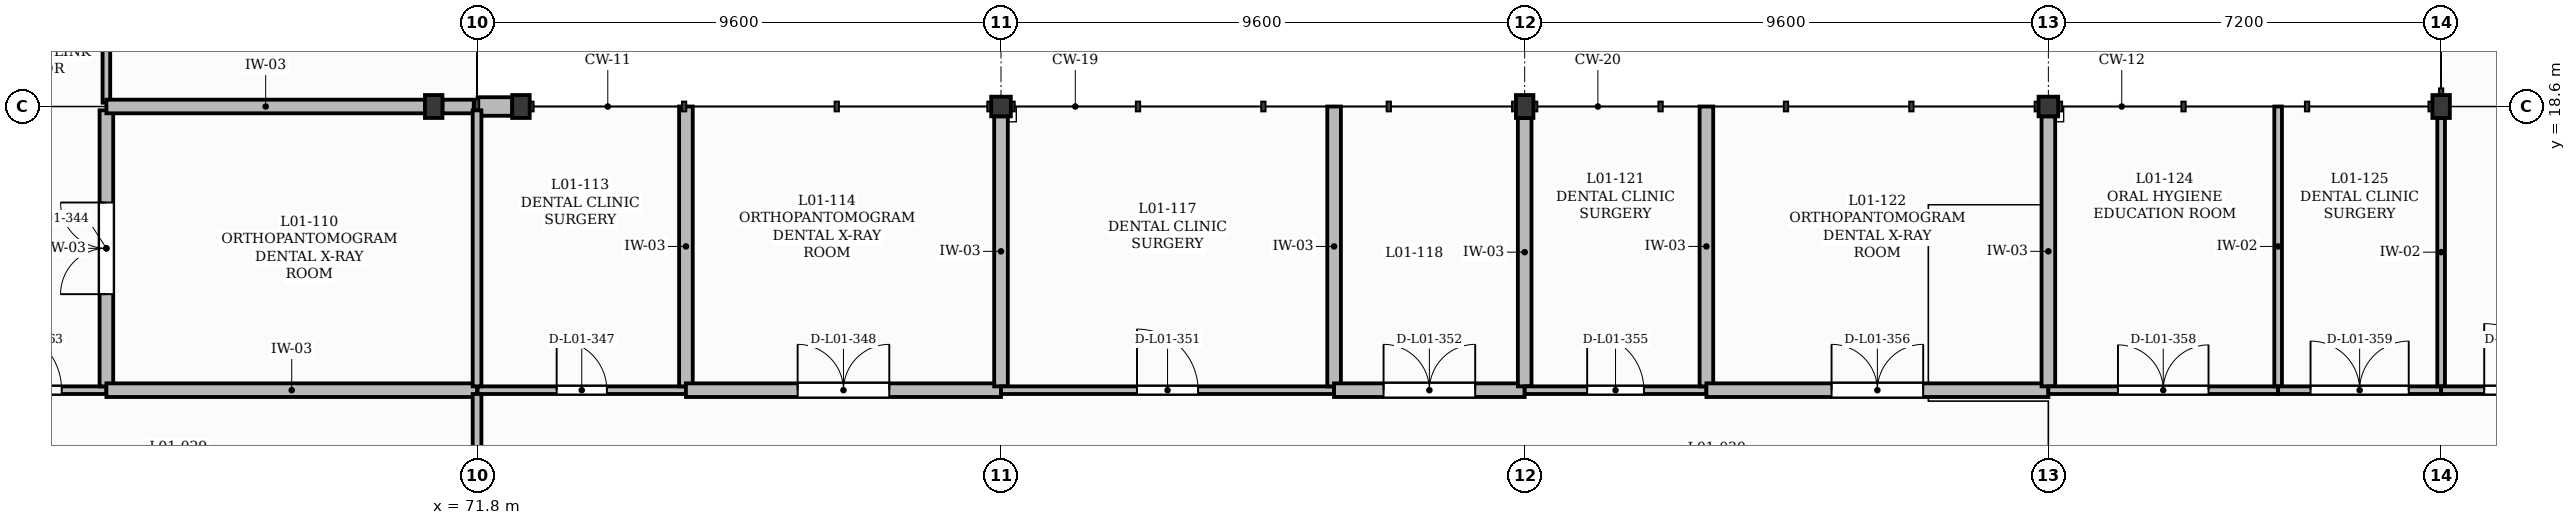
"""IFC4 building model, lengths in metres.
Left out: names, types, materials, properties, quantities, classifications, styles, units other than length and angle.
Written with IfcOpenShell. Run it as: python <this file> out.ifc"""

import sys

from ifc_helpers import new_model, si_unit, direction, frame, frame_2d, origin, origin_2d, place, context, subcontext, project, spatial, rectangle, extrude, element, fill, save


model = new_model("IFC4")
c1 = context("Model", 3, precision=1e-05, world=origin(), true_north=direction((0.0, 1.0)))
c2 = subcontext(c1, "Body", "Model", "MODEL_VIEW")
j1 = project(units=[si_unit("LENGTHUNIT", "METRE"), si_unit("PLANEANGLEUNIT", "RADIAN")], contexts=[c1])
p1 = place(None, origin())
s1 = spatial("IfcSite", under=j1, at=p1, CompositionType="ELEMENT")
p2 = place(p1, origin())
s2 = spatial("IfcBuilding", under=s1, at=p2, CompositionType="ELEMENT")
p3 = place(p2, frame((0.0, 0.0, 4.5)))
s3 = spatial("IfcBuildingStorey", under=s2, at=p3, CompositionType="ELEMENT", Elevation=4.5)
p4 = place(p3, frame((72.6, 18.6, 0.0), z_axis=(0.0, 0.0, 1.0), x_axis=(1.0, 0.0, 0.0)))
e1 = element("IfcColumn", 1, at=p4, inside=s3, PredefinedType="COLUMN", context=c2, shape_type="SweptSolid", body=[
    extrude(rectangle(XDim=0.32, YDim=0.42, at=origin_2d()), origin(), (0.0, 0.0, 1.0), 4.26),
])
p5 = place(p3, frame((81.4, 18.6, 0.0), z_axis=(0.0, 0.0, 1.0), x_axis=(1.0, 0.0, 0.0)))
e2 = element("IfcColumn", 2, at=p5, inside=s3, PredefinedType="COLUMN", context=c2, shape_type="SweptSolid", body=[
    extrude(rectangle(XDim=0.36, YDim=0.36, at=origin_2d()), origin(), (0.0, 0.0, 1.0), 4.26),
])
p6 = place(p3, frame((91.0, 18.6, 0.0), z_axis=(0.0, 0.0, 1.0), x_axis=(1.0, 0.0, 0.0)))
e3 = element("IfcColumn", 3, at=p6, inside=s3, PredefinedType="COLUMN", context=c2, shape_type="SweptSolid", body=[
    extrude(rectangle(XDim=0.32, YDim=0.42, at=origin_2d()), origin(), (0.0, 0.0, 1.0), 4.26),
])
p7 = place(p3, frame((100.6, 18.6, 0.0), z_axis=(0.0, 0.0, 1.0), x_axis=(1.0, 0.0, 0.0)))
e4 = element("IfcColumn", 4, at=p7, inside=s3, PredefinedType="COLUMN", context=c2, shape_type="SweptSolid", body=[
    extrude(rectangle(XDim=0.36, YDim=0.36, at=origin_2d()), origin(), (0.0, 0.0, 1.0), 4.26),
])
for number, where, z_axis, x_axis in (
    (5, (107.8, 18.6, 0.0), (0.0, 0.0, 1.0), (1.0, 0.0, 0.0)),
    (6, (71.0, 18.6, 0.0), (0.0, 0.0, 1.0), (1.0, 0.0, 0.0)),
):
    element("IfcColumn", number, at=place(p3, frame(where, z_axis=z_axis, x_axis=x_axis)), inside=s3, PredefinedType="COLUMN", context=c2, shape_type="SweptSolid", body=[
        extrude(rectangle(XDim=0.32, YDim=0.42, at=origin_2d()), origin(), (0.0, 0.0, 1.0), 4.26),
    ])
p8 = place(p3, frame((71.805, 18.6, 0.0), z_axis=(0.0, 0.0, 1.0), x_axis=(1.0, 0.0, 0.0)))
e7 = element("IfcWall", 7, at=p8, inside=s3, PredefinedType="SOLIDWALL", context=c2, shape_type="SweptSolid", body=[
    extrude(rectangle(XDim=0.635, YDim=0.34, at=frame_2d((0.317, 0.0))), origin(), (0.0, 0.0, 1.0), 4.26),
])
p9 = place(p3, frame((62.2, 13.4, 0.0), z_axis=(0.0, 0.0, 1.0), x_axis=(1.0, 0.0, 0.0)))
e8 = element("IfcWall", 8, at=p9, inside=s3, PredefinedType="PARTITIONING", context=c2, shape_type="SweptSolid", body=[
    extrude(rectangle(XDim=2.8, YDim=0.14, at=frame_2d((1.4, 0.0))), origin(), (0.0, 0.0, 1.0), 4.18),
])
p10 = place(p9, frame((0.82, 0.0, 0.0)))
e9 = element("IfcOpeningElement", 9, at=p10, cuts=e8, PredefinedType="OPENING", context=c2, shape_type="SweptSolid", body=[
    extrude(rectangle(XDim=1.16, YDim=2.1, at=frame_2d((0.58, 1.05))), frame((0.0, 0.08, 0.0), z_axis=(0.0, -1.0, 0.0), x_axis=(1.0, 0.0, 0.0)), (0.0, 0.0, 1.0), 0.16),
])
p11 = place(p3, frame((65.0, 13.47, 0.0), z_axis=(0.0, 0.0, 1.0), x_axis=(0.0, 1.0, 0.0)))
e10 = element("IfcWall", 10, at=p11, inside=s3, PredefinedType="SOLIDWALL", context=c2, shape_type="SweptSolid", body=[
    extrude(rectangle(XDim=5.06, YDim=0.25, at=frame_2d((2.53, 0.0))), origin(), (0.0, 0.0, 1.0), 4.18),
])
p12 = place(p11, frame((1.69, 0.0, 0.0)))
e11 = element("IfcOpeningElement", 11, at=p12, cuts=e10, PredefinedType="OPENING", context=c2, shape_type="SweptSolid", body=[
    extrude(rectangle(XDim=1.68, YDim=2.3, at=frame_2d((0.84, 1.15))), frame((0.0, 0.135, 0.0), z_axis=(0.0, -1.0, 0.0), x_axis=(1.0, 0.0, 0.0)), (0.0, 0.0, 1.0), 0.27),
])
p13 = place(p3, frame((65.0, 13.4, 0.0), z_axis=(0.0, 0.0, 1.0), x_axis=(1.0, 0.0, 0.0)))
e12 = element("IfcWall", 12, at=p13, inside=s3, PredefinedType="SOLIDWALL", context=c2, shape_type="SweptSolid", body=[
    extrude(rectangle(XDim=6.795, YDim=0.25, at=frame_2d((3.397, 0.0))), origin(), (0.0, 0.0, 1.0), 4.18),
])
p14 = place(p3, frame((65.0, 18.67, 0.0), z_axis=(0.0, 0.0, 1.0), x_axis=(0.0, 1.0, 0.0)))
e13 = element("IfcWall", 13, at=p14, inside=s3, PredefinedType="PARTITIONING", context=c2, shape_type="SweptSolid", body=[
    extrude(rectangle(XDim=8.46, YDim=0.14, at=frame_2d((4.23, 0.0))), origin(), (0.0, 0.0, 1.0), 4.18),
])
p15 = place(p14, frame((3.59, 0.0, 0.0)))
e14 = element("IfcOpeningElement", 14, at=p15, cuts=e13, PredefinedType="OPENING", context=c2, shape_type="SweptSolid", body=[
    extrude(rectangle(XDim=1.28, YDim=2.2, at=frame_2d((0.64, 1.1))), frame((0.0, 0.08, 0.0), z_axis=(0.0, -1.0, 0.0), x_axis=(1.0, 0.0, 0.0)), (0.0, 0.0, 1.0), 0.16),
])
p16 = place(p3, frame((65.0, 18.6, 0.0), z_axis=(0.0, 0.0, 1.0), x_axis=(1.0, 0.0, 0.0)))
e15 = element("IfcWall", 15, at=p16, inside=s3, PredefinedType="SOLIDWALL", context=c2, shape_type="SweptSolid", body=[
    extrude(rectangle(XDim=5.84, YDim=0.25, at=frame_2d((2.92, 0.0))), origin(), (0.0, 0.0, 1.0), 3.8),
])
p17 = place(p3, frame((71.16, 18.6, 0.0), z_axis=(0.0, 0.0, 1.0), x_axis=(1.0, 0.0, 0.0)))
e16 = element("IfcWall", 16, at=p17, inside=s3, PredefinedType="SOLIDWALL", context=c2, shape_type="SweptSolid", body=[
    extrude(rectangle(XDim=0.575, YDim=0.25, at=frame_2d((0.288, 0.0))), origin(), (0.0, 0.0, 1.0), 4.18),
])
p18 = place(p3, frame((71.805, 13.4, 0.0), z_axis=(0.0, 0.0, 1.0), x_axis=(1.0, 0.0, 0.0)))
e17 = element("IfcWall", 17, at=p18, inside=s3, PredefinedType="PARTITIONING", context=c2, shape_type="SweptSolid", body=[
    extrude(rectangle(XDim=3.819, YDim=0.14, at=frame_2d((1.91, 0.0))), origin(), (0.0, 0.0, 1.0), 4.18),
])
p19 = place(p18, frame((1.449, 0.0, 0.0)))
e18 = element("IfcOpeningElement", 18, at=p19, cuts=e17, PredefinedType="OPENING", context=c2, shape_type="SweptSolid", body=[
    extrude(rectangle(XDim=0.92, YDim=2.1, at=frame_2d((0.46, 1.05))), frame((0.0, 0.08, 0.0), z_axis=(0.0, -1.0, 0.0), x_axis=(1.0, 0.0, 0.0)), (0.0, 0.0, 1.0), 0.16),
])
p20 = place(p3, frame((75.624, 13.47, 0.0), z_axis=(0.0, 0.0, 1.0), x_axis=(0.0, 1.0, 0.0)))
e19 = element("IfcWall", 19, at=p20, inside=s3, PredefinedType="SOLIDWALL", context=c2, shape_type="SweptSolid", body=[
    extrude(rectangle(XDim=5.13, YDim=0.25, at=frame_2d((2.565, 0.0))), origin(), (0.0, 0.0, 1.0), 4.18),
])
p21 = place(p3, frame((75.624, 13.4, 0.0), z_axis=(0.0, 0.0, 1.0), x_axis=(1.0, 0.0, 0.0)))
e20 = element("IfcWall", 20, at=p21, inside=s3, PredefinedType="SOLIDWALL", context=c2, shape_type="SweptSolid", body=[
    extrude(rectangle(XDim=5.776, YDim=0.25, at=frame_2d((2.888, 0.0))), origin(), (0.0, 0.0, 1.0), 4.18),
])
p22 = place(p21, frame((2.048, 0.0, 0.0)))
e21 = element("IfcOpeningElement", 21, at=p22, cuts=e20, PredefinedType="OPENING", context=c2, shape_type="SweptSolid", body=[
    extrude(rectangle(XDim=1.68, YDim=2.3, at=frame_2d((0.84, 1.15))), frame((0.0, 0.135, 0.0), z_axis=(0.0, -1.0, 0.0), x_axis=(1.0, 0.0, 0.0)), (0.0, 0.0, 1.0), 0.27),
])
p23 = place(p3, frame((81.4, 13.47, 0.0), z_axis=(0.0, 0.0, 1.0), x_axis=(0.0, 1.0, 0.0)))
e22 = element("IfcWall", 22, at=p23, inside=s3, PredefinedType="SOLIDWALL", context=c2, shape_type="SweptSolid", body=[
    extrude(rectangle(XDim=4.95, YDim=0.25, at=frame_2d((2.475, 0.0))), origin(), (0.0, 0.0, 1.0), 3.74),
])
p24 = place(p3, frame((81.4, 13.4, 0.0), z_axis=(0.0, 0.0, 1.0), x_axis=(1.0, 0.0, 0.0)))
e23 = element("IfcWall", 23, at=p24, inside=s3, PredefinedType="PARTITIONING", context=c2, shape_type="SweptSolid", body=[
    extrude(rectangle(XDim=6.106, YDim=0.14, at=frame_2d((3.053, 0.0))), origin(), (0.0, 0.0, 1.0), 4.18),
])
p25 = place(p24, frame((2.493, 0.0, 0.0)))
e24 = element("IfcOpeningElement", 24, at=p25, cuts=e23, PredefinedType="OPENING", context=c2, shape_type="SweptSolid", body=[
    extrude(rectangle(XDim=1.12, YDim=2.15, at=frame_2d((0.56, 1.075))), frame((0.0, 0.08, 0.0), z_axis=(0.0, -1.0, 0.0), x_axis=(1.0, 0.0, 0.0)), (0.0, 0.0, 1.0), 0.16),
])
p26 = place(p3, frame((87.506, 13.47, 0.0), z_axis=(0.0, 0.0, 1.0), x_axis=(0.0, 1.0, 0.0)))
e25 = element("IfcWall", 25, at=p26, inside=s3, PredefinedType="SOLIDWALL", context=c2, shape_type="SweptSolid", body=[
    extrude(rectangle(XDim=5.13, YDim=0.25, at=frame_2d((2.565, 0.0))), origin(), (0.0, 0.0, 1.0), 4.18),
])
p27 = place(p3, frame((87.506, 13.4, 0.0), z_axis=(0.0, 0.0, 1.0), x_axis=(1.0, 0.0, 0.0)))
e26 = element("IfcWall", 26, at=p27, inside=s3, PredefinedType="SOLIDWALL", context=c2, shape_type="SweptSolid", body=[
    extrude(rectangle(XDim=3.494, YDim=0.25, at=frame_2d((1.747, 0.0))), origin(), (0.0, 0.0, 1.0), 4.18),
])
p28 = place(p27, frame((0.907, 0.0, 0.0)))
e27 = element("IfcOpeningElement", 27, at=p28, cuts=e26, PredefinedType="OPENING", context=c2, shape_type="SweptSolid", body=[
    extrude(rectangle(XDim=1.68, YDim=2.3, at=frame_2d((0.84, 1.15))), frame((0.0, 0.135, 0.0), z_axis=(0.0, -1.0, 0.0), x_axis=(1.0, 0.0, 0.0)), (0.0, 0.0, 1.0), 0.27),
])
p29 = place(p3, frame((91.0, 13.47, 0.0), z_axis=(0.0, 0.0, 1.0), x_axis=(0.0, 1.0, 0.0)))
e28 = element("IfcWall", 28, at=p29, inside=s3, PredefinedType="SOLIDWALL", context=c2, shape_type="SweptSolid", body=[
    extrude(rectangle(XDim=4.92, YDim=0.25, at=frame_2d((2.46, 0.0))), origin(), (0.0, 0.0, 1.0), 3.74),
])
p30 = place(p3, frame((91.0, 13.4, 0.0), z_axis=(0.0, 0.0, 1.0), x_axis=(1.0, 0.0, 0.0)))
e29 = element("IfcWall", 29, at=p30, inside=s3, PredefinedType="PARTITIONING", context=c2, shape_type="SweptSolid", body=[
    extrude(rectangle(XDim=3.331, YDim=0.14, at=frame_2d((1.666, 0.0))), origin(), (0.0, 0.0, 1.0), 4.18),
])
p31 = place(p30, frame((1.146, 0.0, 0.0)))
e30 = element("IfcOpeningElement", 30, at=p31, cuts=e29, PredefinedType="OPENING", context=c2, shape_type="SweptSolid", body=[
    extrude(rectangle(XDim=1.04, YDim=2.1, at=frame_2d((0.52, 1.05))), frame((0.0, 0.08, 0.0), z_axis=(0.0, -1.0, 0.0), x_axis=(1.0, 0.0, 0.0)), (0.0, 0.0, 1.0), 0.16),
])
p32 = place(p3, frame((94.331, 13.47, 0.0), z_axis=(0.0, 0.0, 1.0), x_axis=(0.0, 1.0, 0.0)))
e31 = element("IfcWall", 31, at=p32, inside=s3, PredefinedType="SOLIDWALL", context=c2, shape_type="SweptSolid", body=[
    extrude(rectangle(XDim=5.13, YDim=0.25, at=frame_2d((2.565, 0.0))), origin(), (0.0, 0.0, 1.0), 4.18),
])
p33 = place(p3, frame((94.331, 13.4, 0.0), z_axis=(0.0, 0.0, 1.0), x_axis=(1.0, 0.0, 0.0)))
e32 = element("IfcWall", 32, at=p33, inside=s3, PredefinedType="SOLIDWALL", context=c2, shape_type="SweptSolid", body=[
    extrude(rectangle(XDim=6.269, YDim=0.25, at=frame_2d((3.135, 0.0))), origin(), (0.0, 0.0, 1.0), 4.18),
])
p34 = place(p33, frame((2.294, 0.0, 0.0)))
e33 = element("IfcOpeningElement", 33, at=p34, cuts=e32, PredefinedType="OPENING", context=c2, shape_type="SweptSolid", body=[
    extrude(rectangle(XDim=1.68, YDim=2.3, at=frame_2d((0.84, 1.15))), frame((0.0, 0.135, 0.0), z_axis=(0.0, -1.0, 0.0), x_axis=(1.0, 0.0, 0.0)), (0.0, 0.0, 1.0), 0.27),
])
p35 = place(p3, frame((100.6, 13.47, 0.0), z_axis=(0.0, 0.0, 1.0), x_axis=(0.0, 1.0, 0.0)))
e34 = element("IfcWall", 34, at=p35, inside=s3, PredefinedType="SOLIDWALL", context=c2, shape_type="SweptSolid", body=[
    extrude(rectangle(XDim=4.95, YDim=0.25, at=frame_2d((2.475, 0.0))), origin(), (0.0, 0.0, 1.0), 3.74),
])
p36 = place(p3, frame((100.6, 13.4, 0.0), z_axis=(0.0, 0.0, 1.0), x_axis=(1.0, 0.0, 0.0)))
e35 = element("IfcWall", 35, at=p36, inside=s3, PredefinedType="PARTITIONING", context=c2, shape_type="SweptSolid", body=[
    extrude(rectangle(XDim=4.212, YDim=0.14, at=frame_2d((2.106, 0.0))), origin(), (0.0, 0.0, 1.0), 4.18),
])
p37 = place(p36, frame((1.276, 0.0, 0.0)))
e36 = element("IfcOpeningElement", 36, at=p37, cuts=e35, PredefinedType="OPENING", context=c2, shape_type="SweptSolid", body=[
    extrude(rectangle(XDim=1.66, YDim=2.3, at=frame_2d((0.83, 1.15))), frame((0.0, 0.08, 0.0), z_axis=(0.0, -1.0, 0.0), x_axis=(1.0, 0.0, 0.0)), (0.0, 0.0, 1.0), 0.16),
])
p38 = place(p3, frame((104.812, 13.47, 0.0), z_axis=(0.0, 0.0, 1.0), x_axis=(0.0, 1.0, 0.0)))
e37 = element("IfcWall", 37, at=p38, inside=s3, PredefinedType="PARTITIONING", context=c2, shape_type="SweptSolid", body=[
    extrude(rectangle(XDim=5.13, YDim=0.14, at=frame_2d((2.565, 0.0))), origin(), (0.0, 0.0, 1.0), 4.18),
])
p39 = place(p3, frame((104.812, 13.4, 0.0), z_axis=(0.0, 0.0, 1.0), x_axis=(1.0, 0.0, 0.0)))
e38 = element("IfcWall", 38, at=p39, inside=s3, PredefinedType="PARTITIONING", context=c2, shape_type="SweptSolid", body=[
    extrude(rectangle(XDim=2.988, YDim=0.14, at=frame_2d((1.494, 0.0))), origin(), (0.0, 0.0, 1.0), 4.18),
])
p40 = place(p39, frame((0.594, 0.0, 0.0)))
e39 = element("IfcOpeningElement", 39, at=p40, cuts=e38, PredefinedType="OPENING", context=c2, shape_type="SweptSolid", body=[
    extrude(rectangle(XDim=1.8, YDim=2.3, at=frame_2d((0.9, 1.15))), frame((0.0, 0.08, 0.0), z_axis=(0.0, -1.0, 0.0), x_axis=(1.0, 0.0, 0.0)), (0.0, 0.0, 1.0), 0.16),
])
p41 = place(p3, frame((107.8, 13.47, 0.0), z_axis=(0.0, 0.0, 1.0), x_axis=(0.0, 1.0, 0.0)))
e40 = element("IfcWall", 40, at=p41, inside=s3, PredefinedType="PARTITIONING", context=c2, shape_type="SweptSolid", body=[
    extrude(rectangle(XDim=4.92, YDim=0.14, at=frame_2d((2.46, 0.0))), origin(), (0.0, 0.0, 1.0), 3.74),
])
p42 = place(p3, frame((107.8, 13.4, 0.0), z_axis=(0.0, 0.0, 1.0), x_axis=(1.0, 0.0, 0.0)))
e41 = element("IfcWall", 41, at=p42, inside=s3, PredefinedType="PARTITIONING", context=c2, shape_type="SweptSolid", body=[
    extrude(rectangle(XDim=2.8, YDim=0.14, at=frame_2d((1.4, 0.0))), origin(), (0.0, 0.0, 1.0), 4.18),
])
p43 = place(p42, frame((0.79, 0.0, 0.0)))
e42 = element("IfcOpeningElement", 42, at=p43, cuts=e41, PredefinedType="OPENING", context=c2, shape_type="SweptSolid", body=[
    extrude(rectangle(XDim=1.22, YDim=2.1, at=frame_2d((0.61, 1.05))), frame((0.0, 0.08, 0.0), z_axis=(0.0, -1.0, 0.0), x_axis=(1.0, 0.0, 0.0)), (0.0, 0.0, 1.0), 0.16),
])
p44 = place(p3, frame((71.795, 10.87, 0.0), z_axis=(0.0, 0.0, 1.0), x_axis=(0.0, 1.0, 0.0)))
e43 = element("IfcWall", 43, at=p44, inside=s3, PredefinedType="PARTITIONING", context=c2, shape_type="SweptSolid", body=[
    extrude(rectangle(XDim=2.46, YDim=0.16, at=frame_2d((1.23, 0.0))), origin(), (0.0, 0.0, 1.0), 4.18),
])
p45 = place(p3, frame((71.795, 13.47, 0.0), z_axis=(0.0, 0.0, 1.0), x_axis=(0.0, 1.0, 0.0)))
e44 = element("IfcWall", 44, at=p45, inside=s3, PredefinedType="PARTITIONING", context=c2, shape_type="SweptSolid", body=[
    extrude(rectangle(XDim=5.06, YDim=0.16, at=frame_2d((2.53, 0.0))), origin(), (0.0, 0.0, 1.0), 4.18),
])
p46 = place(p10, origin())
e45 = element("IfcDoor", 45, at=p46, inside=s3, OperationType="SINGLE_SWING_LEFT", PredefinedType="DOOR", context=c2, shape_type="SweptSolid", body=[
    extrude(rectangle(XDim=1.16, YDim=2.1, at=frame_2d((0.58, 1.05))), frame((0.0, 0.025, 0.0), z_axis=(0.0, -1.0, 0.0), x_axis=(1.0, 0.0, 0.0)), (0.0, 0.0, 1.0), 0.05),
])
fill(e9, e45)
p47 = place(p43, origin())
e46 = element("IfcDoor", 46, at=p47, inside=s3, OperationType="SINGLE_SWING_LEFT", PredefinedType="DOOR", context=c2, shape_type="SweptSolid", body=[
    extrude(rectangle(XDim=1.22, YDim=2.1, at=frame_2d((0.61, 1.05))), frame((0.0, 0.025, 0.0), z_axis=(0.0, -1.0, 0.0), x_axis=(1.0, 0.0, 0.0)), (0.0, 0.0, 1.0), 0.05),
])
fill(e42, e46)
p48 = place(p12, origin())
e47 = element("IfcDoor", 47, at=p48, inside=s3, OperationType="DOUBLE_DOOR_SINGLE_SWING", PredefinedType="DOOR", context=c2, shape_type="SweptSolid", body=[
    extrude(rectangle(XDim=1.68, YDim=2.3, at=frame_2d((0.84, 1.15))), frame((0.0, 0.025, 0.0), z_axis=(0.0, -1.0, 0.0), x_axis=(1.0, 0.0, 0.0)), (0.0, 0.0, 1.0), 0.05),
])
fill(e11, e47)
p49 = place(p19, origin())
e48 = element("IfcDoor", 48, at=p49, inside=s3, OperationType="SINGLE_SWING_LEFT", PredefinedType="DOOR", context=c2, shape_type="SweptSolid", body=[
    extrude(rectangle(XDim=0.92, YDim=2.1, at=frame_2d((0.46, 1.05))), frame((0.0, 0.025, 0.0), z_axis=(0.0, -1.0, 0.0), x_axis=(1.0, 0.0, 0.0)), (0.0, 0.0, 1.0), 0.05),
])
fill(e18, e48)
p50 = place(p22, origin())
e49 = element("IfcDoor", 49, at=p50, inside=s3, OperationType="DOUBLE_DOOR_SINGLE_SWING", PredefinedType="DOOR", context=c2, shape_type="SweptSolid", body=[
    extrude(rectangle(XDim=1.68, YDim=2.3, at=frame_2d((0.84, 1.15))), frame((0.0, 0.025, 0.0), z_axis=(0.0, -1.0, 0.0), x_axis=(1.0, 0.0, 0.0)), (0.0, 0.0, 1.0), 0.05),
])
fill(e21, e49)
p51 = place(p25, origin())
e50 = element("IfcDoor", 50, at=p51, inside=s3, OperationType="SINGLE_SWING_LEFT", PredefinedType="DOOR", context=c2, shape_type="SweptSolid", body=[
    extrude(rectangle(XDim=1.12, YDim=2.15, at=frame_2d((0.56, 1.075))), frame((0.0, 0.025, 0.0), z_axis=(0.0, -1.0, 0.0), x_axis=(1.0, 0.0, 0.0)), (0.0, 0.0, 1.0), 0.05),
])
fill(e24, e50)
p52 = place(p28, origin())
e51 = element("IfcDoor", 51, at=p52, inside=s3, OperationType="DOUBLE_DOOR_SINGLE_SWING", PredefinedType="DOOR", context=c2, shape_type="SweptSolid", body=[
    extrude(rectangle(XDim=1.68, YDim=2.3, at=frame_2d((0.84, 1.15))), frame((0.0, 0.025, 0.0), z_axis=(0.0, -1.0, 0.0), x_axis=(1.0, 0.0, 0.0)), (0.0, 0.0, 1.0), 0.05),
])
fill(e27, e51)
p53 = place(p31, origin())
e52 = element("IfcDoor", 52, at=p53, inside=s3, OperationType="SINGLE_SWING_LEFT", PredefinedType="DOOR", context=c2, shape_type="SweptSolid", body=[
    extrude(rectangle(XDim=1.04, YDim=2.1, at=frame_2d((0.52, 1.05))), frame((0.0, 0.025, 0.0), z_axis=(0.0, -1.0, 0.0), x_axis=(1.0, 0.0, 0.0)), (0.0, 0.0, 1.0), 0.05),
])
fill(e30, e52)
p54 = place(p34, origin())
e53 = element("IfcDoor", 53, at=p54, inside=s3, OperationType="DOUBLE_DOOR_SINGLE_SWING", PredefinedType="DOOR", context=c2, shape_type="SweptSolid", body=[
    extrude(rectangle(XDim=1.68, YDim=2.3, at=frame_2d((0.84, 1.15))), frame((0.0, 0.025, 0.0), z_axis=(0.0, -1.0, 0.0), x_axis=(1.0, 0.0, 0.0)), (0.0, 0.0, 1.0), 0.05),
])
fill(e33, e53)
p55 = place(p37, origin())
e54 = element("IfcDoor", 54, at=p55, inside=s3, OperationType="DOUBLE_DOOR_SINGLE_SWING", PredefinedType="DOOR", context=c2, shape_type="SweptSolid", body=[
    extrude(rectangle(XDim=1.66, YDim=2.3, at=frame_2d((0.83, 1.15))), frame((0.0, 0.025, 0.0), z_axis=(0.0, -1.0, 0.0), x_axis=(1.0, 0.0, 0.0)), (0.0, 0.0, 1.0), 0.05),
])
fill(e36, e54)
p56 = place(p40, origin())
e55 = element("IfcDoor", 55, at=p56, inside=s3, OperationType="DOUBLE_DOOR_SINGLE_SWING", PredefinedType="DOOR", context=c2, shape_type="SweptSolid", body=[
    extrude(rectangle(XDim=1.8, YDim=2.3, at=frame_2d((0.9, 1.15))), frame((0.0, 0.025, 0.0), z_axis=(0.0, -1.0, 0.0), x_axis=(1.0, 0.0, 0.0)), (0.0, 0.0, 1.0), 0.05),
])
fill(e39, e55)
save(model, sys.argv[1])
